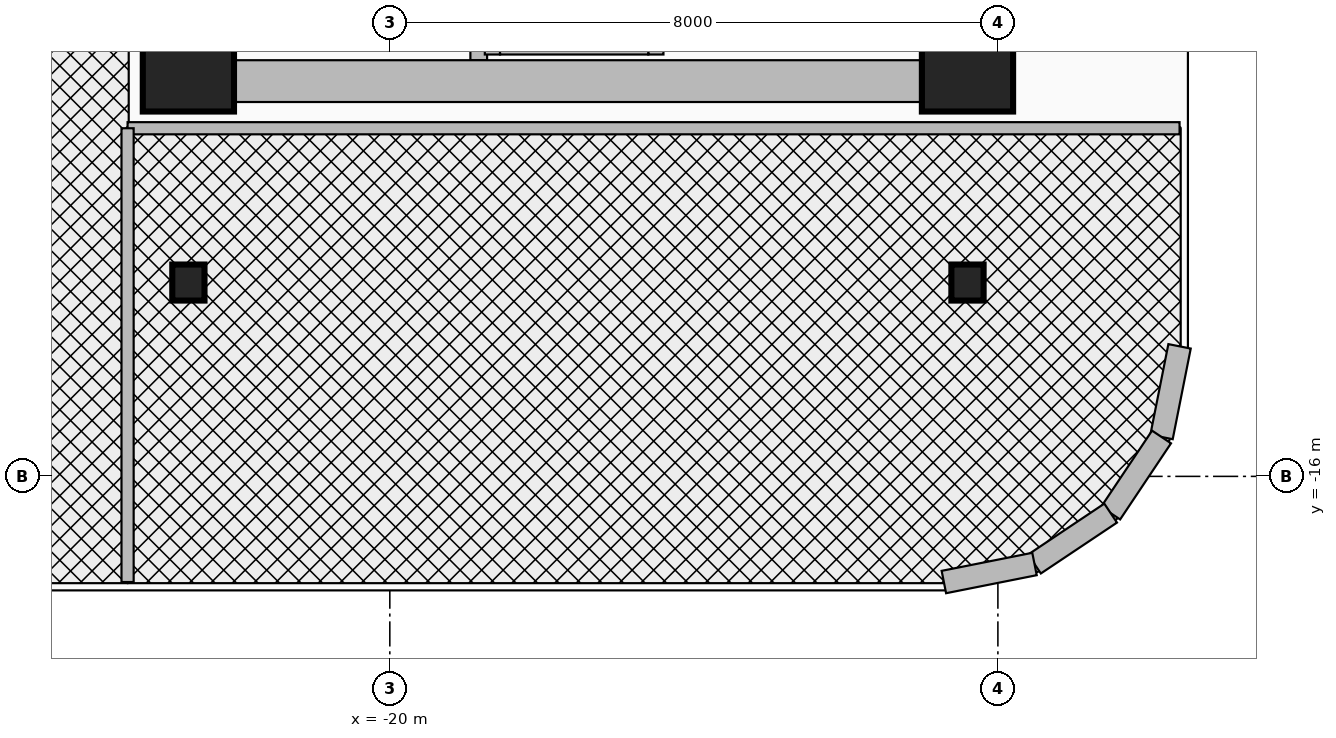
"""IFC4 building model, lengths in metres.
Left out: names, types, materials, properties, quantities, classifications, styles, units other than length and angle.
Written with IfcOpenShell. Run it as: python <this file> out.ifc"""

import sys

from ifc_helpers import new_model, si_unit, direction, frame, frame_2d, origin, origin_2d, place, context, subcontext, project, spatial, rectangle, i_section, extrude, source, transform, mapped, element, fill, save


model = new_model("IFC4")
c1 = context("Model", 3, precision=1e-05, world=origin(), true_north=direction((0.0, 1.0)))
c2 = subcontext(c1, "Body", "Model", "MODEL_VIEW")
j1 = project(units=[si_unit("LENGTHUNIT", "METRE"), si_unit("PLANEANGLEUNIT", "RADIAN")], contexts=[c1])
p1 = place(None, origin())
s1 = spatial("IfcSite", under=j1, at=p1, CompositionType="ELEMENT")
p2 = place(p1, origin())
s2 = spatial("IfcBuilding", under=s1, at=p2, CompositionType="ELEMENT")
p3 = place(p2, frame((0.0, 0.0, 153.8)))
s3 = spatial("IfcBuildingStorey", under=s2, at=p3, CompositionType="ELEMENT", Elevation=153.8)
for number, where, z_axis, x_axis in (
    (1, (-22.16, -10.525, 0.0), (0.0, 0.0, 1.0), (0.0, 1.0, 0.0)),
    (2, (-18.83, -10.525, 0.0), (0.0, 0.0, 1.0), (0.0, 1.0, 0.0)),
):
    element("IfcWall", number, at=place(p3, frame(where, z_axis=z_axis, x_axis=x_axis)), inside=s3, PredefinedType="SHEAR", context=c2, shape_type="SweptSolid", body=[
        extrude(rectangle(XDim=8.745, YDim=0.22, at=frame_2d((4.373, 0.0))), origin(), (0.0, 0.0, 1.0), 3.46),
    ])
p4 = place(p3, frame((-22.65, -11.075, 0.0), z_axis=(0.0, 0.0, 1.0), x_axis=(0.0, 1.0, 0.0)))
e3 = element("IfcWall", 3, at=p4, inside=s3, PredefinedType="SHEAR", context=c2, shape_type="SweptSolid", body=[
    extrude(rectangle(XDim=22.15, YDim=0.55, at=frame_2d((11.075, 0.0))), origin(), (0.0, 0.0, 1.0), 3.46),
])
p5 = place(p3, frame((-22.65, -10.8, 0.0), z_axis=(0.0, 0.0, 1.0), x_axis=(1.0, 0.0, 0.0)))
e4 = element("IfcWall", 4, at=p5, inside=s3, PredefinedType="SHEAR", context=c2, shape_type="SweptSolid", body=[
    extrude(rectangle(XDim=10.25, YDim=0.55, at=frame_2d((5.125, 0.0))), origin(), (0.0, 0.0, 1.0), 3.46),
])
m1 = source(origin(), c2, "Body", "SweptSolid", [
    extrude(rectangle(XDim=1.2, YDim=1.2, at=origin_2d()), origin(), (0.0, 0.0, 1.0), 3.7),
])
for number, where, z_axis, x_axis in (
    (5, (-22.65, -10.6, 0.0), (0.0, 0.0, 1.0), (1.0, 0.0, 0.0)),
    (6, (-12.4, -10.6, 0.0), (0.0, 0.0, 1.0), (1.0, 0.0, 0.0)),
):
    element("IfcColumn", number, at=place(p3, frame(where, z_axis=z_axis, x_axis=x_axis)), inside=s3, PredefinedType="COLUMN", context=c2, shape_type="MappedRepresentation", body=[
        mapped(m1, transform((0.0, 0.0, 0.0), x_axis=(1.0, 0.0, 0.0), y_axis=(0.0, 1.0, 0.0), z_axis=(0.0, 0.0, 1.0), scale=1.0)),
    ])
m2 = source(origin(), c2, "Body", "SweptSolid", [
    extrude(i_section(OverallWidth=0.424, OverallDepth=0.474, WebThickness=0.048, FlangeThickness=0.077, at=origin_2d()), origin(), (0.0, 0.0, 1.0), 3.7),
])
for number, where, z_axis, x_axis in (
    (7, (-22.65, -13.45, 0.0), (0.0, 0.0, 1.0), (1.0, 0.0, 0.0)),
    (8, (-12.4, -13.45, 0.0), (0.0, 0.0, 1.0), (1.0, 0.0, 0.0)),
):
    element("IfcColumn", number, at=place(p3, frame(where, z_axis=z_axis, x_axis=x_axis)), inside=s3, PredefinedType="COLUMN", context=c2, shape_type="MappedRepresentation", body=[
        mapped(m2, transform((0.0, 0.0, 0.0), x_axis=(1.0, 0.0, 0.0), y_axis=(0.0, 1.0, 0.0), z_axis=(0.0, 0.0, 1.0), scale=1.0)),
    ])
p6 = place(p3, frame((-9.61, -14.289, 0.0), z_axis=(0.0, 0.0, 1.0), x_axis=(-0.194996050505, -0.980804027463, 0.0)))
e9 = element("IfcWall", 9, at=p6, inside=s3, PredefinedType="SOLIDWALL", context=c2, shape_type="SweptSolid", body=[
    extrude(rectangle(XDim=1.216, YDim=0.3, at=frame_2d((0.608, 0.0))), origin(), (0.0, 0.0, 1.0), 3.46),
])
for number, where, z_axis, x_axis in (
    (10, (-9.847, -15.482, 0.0), (0.0, 0.0, 1.0), (-0.556, -0.831, 0.0)),
    (11, (-10.517, -16.483, 0.0), (0.0, 0.0, 1.0), (-0.831, -0.556, 0.0)),
):
    element("IfcWall", number, at=place(p3, frame(where, z_axis=z_axis, x_axis=x_axis)), inside=s3, PredefinedType="SOLIDWALL", context=c2, shape_type="SweptSolid", body=[
        extrude(rectangle(XDim=1.205, YDim=0.3, at=frame_2d((0.603, 0.0))), origin(), (0.0, 0.0, 1.0), 3.46),
    ])
p7 = place(p3, frame((-11.518, -17.153, 0.0), z_axis=(0.0, 0.0, 1.0), x_axis=(-0.980804027463, -0.194996050505, 0.0)))
e12 = element("IfcWall", 12, at=p7, inside=s3, PredefinedType="SOLIDWALL", context=c2, shape_type="SweptSolid", body=[
    extrude(rectangle(XDim=1.216, YDim=0.3, at=frame_2d((0.608, 0.0))), origin(), (0.0, 0.0, 1.0), 3.46),
])
for number, where, z_axis, x_axis in (
    (13, (-18.65, -10.45, 0.0), (0.0, 0.0, 1.0), (0.0, 1.0, 0.0)),
    (14, (-16.5, -10.45, 0.0), (0.0, 0.0, 1.0), (0.0, 1.0, 0.0)),
):
    element("IfcWall", number, at=place(p3, frame(where, z_axis=z_axis, x_axis=x_axis)), inside=s3, PredefinedType="MOVABLE", context=c2, shape_type="SweptSolid", body=[
        extrude(rectangle(XDim=2.35, YDim=0.2, at=frame_2d((1.175, 0.0))), origin(), (0.0, 0.0, 1.0), 2.666),
    ])
p8 = place(p3, frame((-18.55, -10.35, 0.0), z_axis=(0.0, 0.0, 1.0), x_axis=(1.0, 0.0, 0.0)))
e15 = element("IfcWall", 15, at=p8, inside=s3, PredefinedType="MOVABLE", context=c2, shape_type="SweptSolid", body=[
    extrude(rectangle(XDim=1.95, YDim=0.2, at=frame_2d((0.975, 0.0))), origin(), (0.0, 0.0, 1.0), 2.666),
])
p9 = place(p3, frame((-23.45, -11.42, 0.0), z_axis=(0.0, 0.0, 1.0), x_axis=(1.0, 0.0, 0.0)))
e16 = element("IfcWall", 16, at=p9, inside=s3, PredefinedType="PARTITIONING", context=c2, shape_type="SweptSolid", body=[
    extrude(rectangle(XDim=13.84, YDim=0.16, at=frame_2d((6.92, 0.0))), origin(), (0.0, 0.0, 1.0), 2.834),
])
p10 = place(p3, frame((-23.45, -17.39, 0.0), z_axis=(0.0, 0.0, 1.0), x_axis=(0.0, 1.0, 0.0)))
e17 = element("IfcWall", 17, at=p10, inside=s3, PredefinedType="PARTITIONING", context=c2, shape_type="SweptSolid", body=[
    extrude(rectangle(XDim=5.97, YDim=0.16, at=frame_2d((2.985, 0.0))), origin(), (0.0, 0.0, 1.0), 3.46),
])
p11 = place(p10, frame((2.535, 0.0, 0.0)))
e18 = element("IfcOpeningElement", 18, at=p11, cuts=e17, PredefinedType="OPENING", context=c2, shape_type="SweptSolid", body=[
    extrude(rectangle(XDim=0.9, YDim=2.1, at=frame_2d((0.45, 1.05))), frame((0.0, 0.095, 0.0), z_axis=(0.0, -1.0, 0.0), x_axis=(1.0, 0.0, 0.0)), (0.0, 0.0, 1.0), 0.19),
])
p12 = place(p11, origin())
e19 = element("IfcDoor", 19, at=p12, inside=s3, OperationType="SINGLE_SWING_RIGHT", PredefinedType="DOOR", context=c2, shape_type="SweptSolid", body=[
    extrude(rectangle(XDim=0.9, YDim=2.1, at=frame_2d((0.45, 1.05))), frame((0.0, 0.025, 0.0), z_axis=(0.0, -1.0, 0.0), x_axis=(1.0, 0.0, 0.0)), (0.0, 0.0, 1.0), 0.05),
])
fill(e18, e19)
save(model, sys.argv[1])
